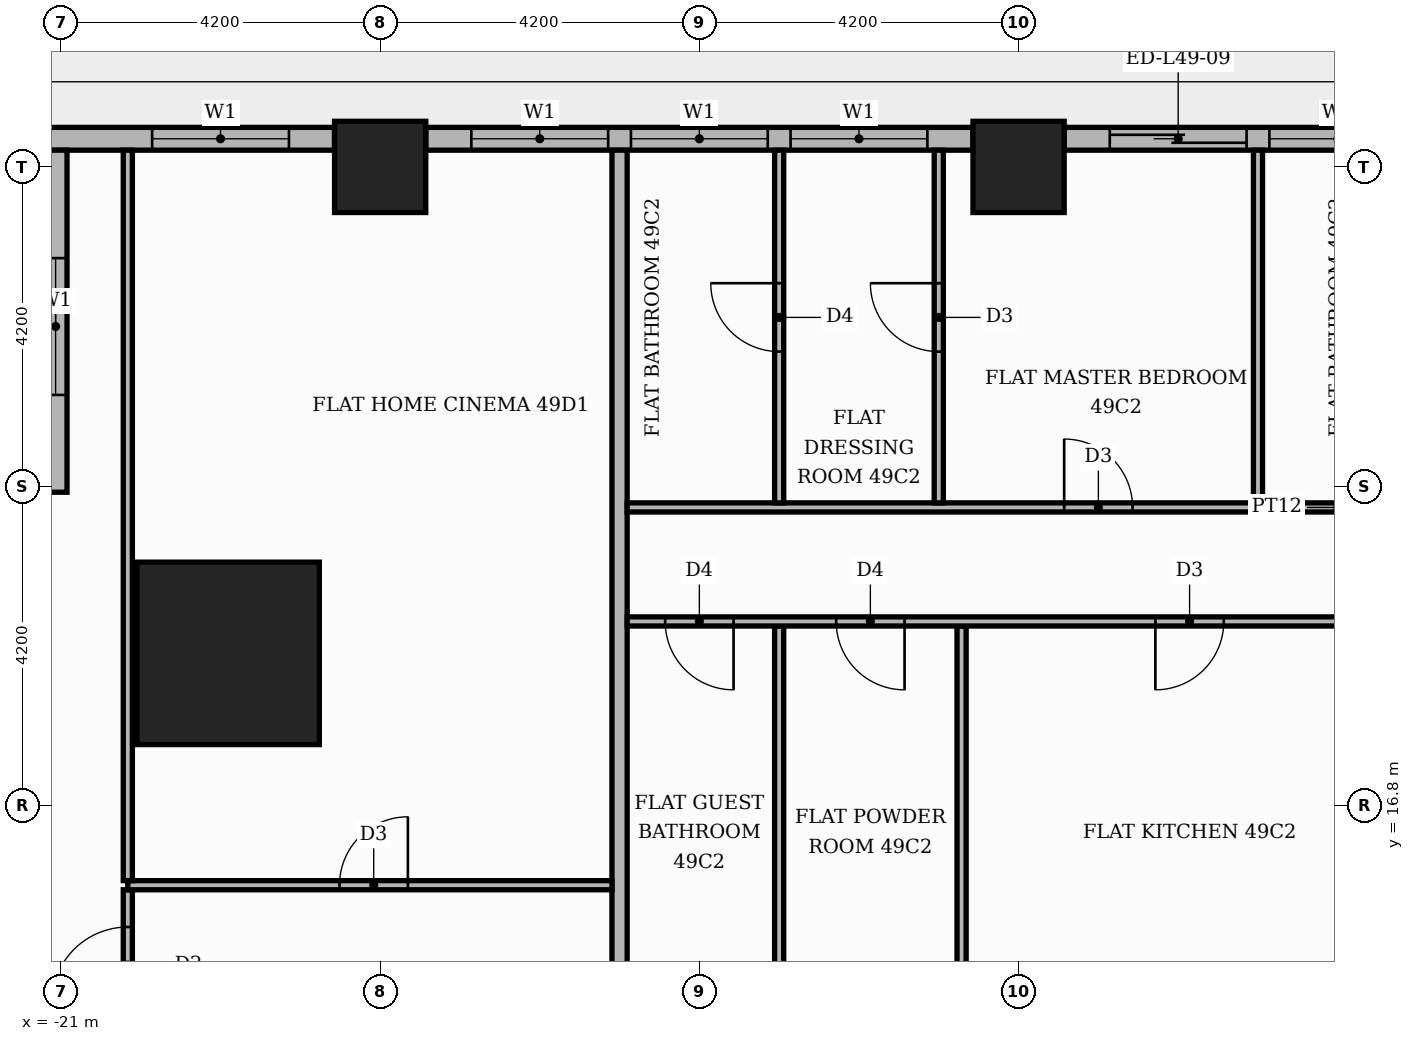
"""IFC4 building model, lengths in metres.
Left out: names, types, materials, properties, quantities, classifications, styles, units other than length and angle.
Written with IfcOpenShell. Run it as: python <this file> out.ifc"""

import sys

from ifc_helpers import new_model, si_unit, direction, frame, frame_2d, origin, origin_2d, place, context, subcontext, project, spatial, rectangle, extrude, element, fill, save


model = new_model("IFC4")
c1 = context("Model", 3, precision=1e-05, world=origin(), true_north=direction((0.0, 1.0)))
c2 = subcontext(c1, "Body", "Model", "MODEL_VIEW")
j1 = project(units=[si_unit("LENGTHUNIT", "METRE"), si_unit("PLANEANGLEUNIT", "RADIAN")], contexts=[c1])
p1 = place(None, origin())
s1 = spatial("IfcSite", under=j1, at=p1, CompositionType="ELEMENT")
p2 = place(p1, origin())
s2 = spatial("IfcBuilding", under=s1, at=p2, CompositionType="ELEMENT")
p3 = place(p2, frame((0.0, 0.0, 207.9)))
s3 = spatial("IfcBuildingStorey", under=s2, at=p3, CompositionType="ELEMENT", Elevation=207.9)
p4 = place(p3, frame((-18.8, 18.8, 0.0), z_axis=(0.0, 0.0, 1.0), x_axis=(1.0, 0.0, 0.0)))
e1 = element("IfcColumn", 1, at=p4, inside=s3, PredefinedType="COLUMN", context=c2, shape_type="SweptSolid", body=[
    extrude(rectangle(XDim=2.4, YDim=2.4, at=origin_2d()), origin(), (0.0, 0.0, 1.0), 3.9),
])
for number, where, z_axis, x_axis in (
    (2, (-8.4, 25.2, 0.0), (0.0, 0.0, 1.0), (1.0, 0.0, 0.0)),
    (3, (-16.8, 25.2, 0.0), (0.0, 0.0, 1.0), (1.0, 0.0, 0.0)),
):
    element("IfcColumn", number, at=place(p3, frame(where, z_axis=z_axis, x_axis=x_axis)), inside=s3, PredefinedType="COLUMN", context=c2, shape_type="SweptSolid", body=[
        extrude(rectangle(XDim=1.2, YDim=1.2, at=origin_2d()), origin(), (0.0, 0.0, 1.0), 3.9),
    ])
p5 = place(p3, frame((-0.6, 25.57, 0.0), z_axis=(0.0, 0.0, 1.0), x_axis=(-1.0, 0.0, 0.0)))
e4 = element("IfcWall", 4, at=p5, inside=s3, PredefinedType="STANDARD", context=c2, shape_type="SweptSolid", body=[
    extrude(rectangle(XDim=7.2, YDim=0.3, at=frame_2d((3.6, 0.0))), origin(), (0.0, 0.0, 1.0), 3.48),
])
p6 = place(p5, frame((0.6, 0.0, 0.9)))
e5 = element("IfcOpeningElement", 5, at=p6, cuts=e4, PredefinedType="OPENING", context=c2, shape_type="SweptSolid", body=[
    extrude(rectangle(XDim=1.8, YDim=2.1, at=frame_2d((0.9, 1.05))), frame((0.0, 0.16, 0.0), z_axis=(0.0, -1.0, 0.0), x_axis=(1.0, 0.0, 0.0)), (0.0, 0.0, 1.0), 0.32),
])
p7 = place(p5, frame((2.7, 0.0, 0.9)))
e6 = element("IfcOpeningElement", 6, at=p7, cuts=e4, PredefinedType="OPENING", context=c2, shape_type="SweptSolid", body=[
    extrude(rectangle(XDim=1.8, YDim=2.1, at=frame_2d((0.9, 1.05))), frame((0.0, 0.16, 0.0), z_axis=(0.0, -1.0, 0.0), x_axis=(1.0, 0.0, 0.0)), (0.0, 0.0, 1.0), 0.32),
])
p8 = place(p5, frame((4.8, 0.0, 0.0)))
e7 = element("IfcOpeningElement", 7, at=p8, cuts=e4, PredefinedType="OPENING", context=c2, shape_type="SweptSolid", body=[
    extrude(rectangle(XDim=1.8, YDim=2.4, at=frame_2d((0.9, 1.2))), frame((0.0, 0.16, 0.0), z_axis=(0.0, -1.0, 0.0), x_axis=(1.0, 0.0, 0.0)), (0.0, 0.0, 1.0), 0.32),
])
p9 = place(p3, frame((-9.0, 25.57, 0.0), z_axis=(0.0, 0.0, 1.0), x_axis=(-1.0, 0.0, 0.0)))
e8 = element("IfcWall", 8, at=p9, inside=s3, PredefinedType="STANDARD", context=c2, shape_type="SweptSolid", body=[
    extrude(rectangle(XDim=7.2, YDim=0.3, at=frame_2d((3.6, 0.0))), origin(), (0.0, 0.0, 1.0), 3.48),
])
p10 = place(p9, frame((0.6, 0.0, 0.9)))
e9 = element("IfcOpeningElement", 9, at=p10, cuts=e8, PredefinedType="OPENING", context=c2, shape_type="SweptSolid", body=[
    extrude(rectangle(XDim=1.8, YDim=2.1, at=frame_2d((0.9, 1.05))), frame((0.0, 0.16, 0.0), z_axis=(0.0, -1.0, 0.0), x_axis=(1.0, 0.0, 0.0)), (0.0, 0.0, 1.0), 0.32),
])
p11 = place(p9, frame((2.7, 0.0, 0.9)))
e10 = element("IfcOpeningElement", 10, at=p11, cuts=e8, PredefinedType="OPENING", context=c2, shape_type="SweptSolid", body=[
    extrude(rectangle(XDim=1.8, YDim=2.1, at=frame_2d((0.9, 1.05))), frame((0.0, 0.16, 0.0), z_axis=(0.0, -1.0, 0.0), x_axis=(1.0, 0.0, 0.0)), (0.0, 0.0, 1.0), 0.32),
])
p12 = place(p9, frame((4.8, 0.0, 0.9)))
e11 = element("IfcOpeningElement", 11, at=p12, cuts=e8, PredefinedType="OPENING", context=c2, shape_type="SweptSolid", body=[
    extrude(rectangle(XDim=1.8, YDim=2.1, at=frame_2d((0.9, 1.05))), frame((0.0, 0.16, 0.0), z_axis=(0.0, -1.0, 0.0), x_axis=(1.0, 0.0, 0.0)), (0.0, 0.0, 1.0), 0.32),
])
p13 = place(p3, frame((-17.4, 25.57, 0.0), z_axis=(0.0, 0.0, 1.0), x_axis=(-1.0, 0.0, 0.0)))
e12 = element("IfcWall", 12, at=p13, inside=s3, PredefinedType="STANDARD", context=c2, shape_type="SweptSolid", body=[
    extrude(rectangle(XDim=3.82, YDim=0.3, at=frame_2d((1.91, 0.0))), origin(), (0.0, 0.0, 1.0), 3.48),
])
p14 = place(p13, frame((0.6, 0.0, 0.9)))
e13 = element("IfcOpeningElement", 13, at=p14, cuts=e12, PredefinedType="OPENING", context=c2, shape_type="SweptSolid", body=[
    extrude(rectangle(XDim=1.8, YDim=2.1, at=frame_2d((0.9, 1.05))), frame((0.0, 0.16, 0.0), z_axis=(0.0, -1.0, 0.0), x_axis=(1.0, 0.0, 0.0)), (0.0, 0.0, 1.0), 0.32),
])
p15 = place(p3, frame((-21.07, 25.42, 0.0), z_axis=(0.0, 0.0, 1.0), x_axis=(0.0, -1.0, 0.0)))
e14 = element("IfcWall", 14, at=p15, inside=s3, PredefinedType="STANDARD", context=c2, shape_type="SweptSolid", body=[
    extrude(rectangle(XDim=4.5, YDim=0.3, at=frame_2d((2.25, 0.0))), origin(), (0.0, 0.0, 1.0), 3.48),
])
p16 = place(p15, frame((1.42, 0.0, 0.9)))
e15 = element("IfcOpeningElement", 15, at=p16, cuts=e14, PredefinedType="OPENING", context=c2, shape_type="SweptSolid", body=[
    extrude(rectangle(XDim=1.8, YDim=2.1, at=frame_2d((0.9, 1.05))), frame((0.0, 0.16, 0.0), z_axis=(0.0, -1.0, 0.0), x_axis=(1.0, 0.0, 0.0)), (0.0, 0.0, 1.0), 0.32),
])
p17 = place(p3, frame((-20.12, 13.71, 0.0), z_axis=(0.0, 0.0, 1.0), x_axis=(0.0, 1.0, 0.0)))
e16 = element("IfcWall", 16, at=p17, inside=s3, PredefinedType="PARTITIONING", context=c2, shape_type="SweptSolid", body=[
    extrude(rectangle(XDim=1.98, YDim=0.12, at=frame_2d((0.99, 0.0))), origin(), (0.0, 0.0, 1.0), 3.48),
])
p18 = place(p17, frame((0.49, 0.0, 0.0)))
e17 = element("IfcOpeningElement", 17, at=p18, cuts=e16, PredefinedType="OPENING", context=c2, shape_type="SweptSolid", body=[
    extrude(rectangle(XDim=1.0, YDim=2.1, at=frame_2d((0.5, 1.05))), frame((0.0, 0.07, 0.0), z_axis=(0.0, -1.0, 0.0), x_axis=(1.0, 0.0, 0.0)), (0.0, 0.0, 1.0), 0.14),
])
p19 = place(p3, frame((-13.65, 13.75, 0.0), z_axis=(0.0, 0.0, 1.0), x_axis=(0.0, 1.0, 0.0)))
e18 = element("IfcWall", 18, at=p19, inside=s3, PredefinedType="PARTITIONING", context=c2, shape_type="SweptSolid", body=[
    extrude(rectangle(XDim=11.67, YDim=0.2, at=frame_2d((5.835, 0.0))), origin(), (0.0, 0.0, 1.0), 3.48),
])
for number, where, z_axis, x_axis in (
    (19, (-11.55, 13.75, 0.0), (0.0, 0.0, 1.0), (0.0, 1.0, 0.0)),
    (20, (-9.15, 13.75, 0.0), (0.0, 0.0, 1.0), (0.0, 1.0, 0.0)),
):
    element("IfcWall", number, at=place(p3, frame(where, z_axis=z_axis, x_axis=x_axis)), inside=s3, PredefinedType="PARTITIONING", context=c2, shape_type="SweptSolid", body=[
        extrude(rectangle(XDim=5.41, YDim=0.12, at=frame_2d((2.705, 0.0))), origin(), (0.0, 0.0, 1.0), 3.48),
    ])
p20 = place(p3, frame((-20.12, 15.75, 0.0), z_axis=(0.0, 0.0, 1.0), x_axis=(1.0, 0.0, 0.0)))
e21 = element("IfcWall", 21, at=p20, inside=s3, PredefinedType="PARTITIONING", context=c2, shape_type="SweptSolid", body=[
    extrude(rectangle(XDim=6.37, YDim=0.12, at=frame_2d((3.185, 0.0))), origin(), (0.0, 0.0, 1.0), 3.48),
])
p21 = place(p20, frame((2.785, 0.0, 0.0)))
e22 = element("IfcOpeningElement", 22, at=p21, cuts=e21, PredefinedType="OPENING", context=c2, shape_type="SweptSolid", body=[
    extrude(rectangle(XDim=0.9, YDim=2.1, at=frame_2d((0.45, 1.05))), frame((0.0, 0.07, 0.0), z_axis=(0.0, -1.0, 0.0), x_axis=(1.0, 0.0, 0.0)), (0.0, 0.0, 1.0), 0.14),
])
p22 = place(p3, frame((-20.12, 15.81, 0.0), z_axis=(0.0, 0.0, 1.0), x_axis=(0.0, 1.0, 0.0)))
e23 = element("IfcWall", 23, at=p22, inside=s3, PredefinedType="PARTITIONING", context=c2, shape_type="SweptSolid", body=[
    extrude(rectangle(XDim=9.61, YDim=0.12, at=frame_2d((4.805, 0.0))), origin(), (0.0, 0.0, 1.0), 3.48),
])
p23 = place(p3, frame((-13.55, 19.22, 0.0), z_axis=(0.0, 0.0, 1.0), x_axis=(1.0, 0.0, 0.0)))
e24 = element("IfcWall", 24, at=p23, inside=s3, PredefinedType="PARTITIONING", context=c2, shape_type="SweptSolid", body=[
    extrude(rectangle(XDim=10.4, YDim=0.12, at=frame_2d((5.2, 0.0))), origin(), (0.0, 0.0, 1.0), 3.48),
])
p24 = place(p23, frame((6.95, 0.0, 0.0)))
e25 = element("IfcOpeningElement", 25, at=p24, cuts=e24, PredefinedType="OPENING", context=c2, shape_type="SweptSolid", body=[
    extrude(rectangle(XDim=0.9, YDim=2.1, at=frame_2d((0.45, 1.05))), frame((0.0, 0.07, 0.0), z_axis=(0.0, -1.0, 0.0), x_axis=(1.0, 0.0, 0.0)), (0.0, 0.0, 1.0), 0.14),
])
p25 = place(p23, frame((2.75, 0.0, 0.0)))
e26 = element("IfcOpeningElement", 26, at=p25, cuts=e24, PredefinedType="OPENING", context=c2, shape_type="SweptSolid", body=[
    extrude(rectangle(XDim=0.9, YDim=2.1, at=frame_2d((0.45, 1.05))), frame((0.0, 0.07, 0.0), z_axis=(0.0, -1.0, 0.0), x_axis=(1.0, 0.0, 0.0)), (0.0, 0.0, 1.0), 0.14),
])
p26 = place(p23, frame((0.5, 0.0, 0.0)))
e27 = element("IfcOpeningElement", 27, at=p26, cuts=e24, PredefinedType="OPENING", context=c2, shape_type="SweptSolid", body=[
    extrude(rectangle(XDim=0.9, YDim=2.1, at=frame_2d((0.45, 1.05))), frame((0.0, 0.07, 0.0), z_axis=(0.0, -1.0, 0.0), x_axis=(1.0, 0.0, 0.0)), (0.0, 0.0, 1.0), 0.14),
])
p27 = place(p3, frame((-13.55, 20.72, 0.0), z_axis=(0.0, 0.0, 1.0), x_axis=(1.0, 0.0, 0.0)))
e28 = element("IfcWall", 28, at=p27, inside=s3, PredefinedType="PARTITIONING", context=c2, shape_type="SweptSolid", body=[
    extrude(rectangle(XDim=18.7, YDim=0.12, at=frame_2d((9.35, 0.0))), origin(), (0.0, 0.0, 1.0), 3.48),
])
p28 = place(p27, frame((16.2, 0.0, 0.0)))
e29 = element("IfcOpeningElement", 29, at=p28, cuts=e28, PredefinedType="OPENING", context=c2, shape_type="SweptSolid", body=[
    extrude(rectangle(XDim=1.0, YDim=2.1, at=frame_2d((0.5, 1.05))), frame((0.0, 0.07, 0.0), z_axis=(0.0, -1.0, 0.0), x_axis=(1.0, 0.0, 0.0)), (0.0, 0.0, 1.0), 0.14),
])
p29 = place(p27, frame((12.05, 0.0, 0.0)))
e30 = element("IfcOpeningElement", 30, at=p29, cuts=e28, PredefinedType="OPENING", context=c2, shape_type="SweptSolid", body=[
    extrude(rectangle(XDim=0.9, YDim=2.1, at=frame_2d((0.45, 1.05))), frame((0.0, 0.07, 0.0), z_axis=(0.0, -1.0, 0.0), x_axis=(1.0, 0.0, 0.0)), (0.0, 0.0, 1.0), 0.14),
])
p30 = place(p27, frame((5.75, 0.0, 0.0)))
e31 = element("IfcOpeningElement", 31, at=p30, cuts=e28, PredefinedType="OPENING", context=c2, shape_type="SweptSolid", body=[
    extrude(rectangle(XDim=0.9, YDim=2.1, at=frame_2d((0.45, 1.05))), frame((0.0, 0.07, 0.0), z_axis=(0.0, -1.0, 0.0), x_axis=(1.0, 0.0, 0.0)), (0.0, 0.0, 1.0), 0.14),
])
p31 = place(p3, frame((-11.55, 20.78, 0.0), z_axis=(0.0, 0.0, 1.0), x_axis=(0.0, 1.0, 0.0)))
e32 = element("IfcWall", 32, at=p31, inside=s3, PredefinedType="PARTITIONING", context=c2, shape_type="SweptSolid", body=[
    extrude(rectangle(XDim=4.64, YDim=0.12, at=frame_2d((2.32, 0.0))), origin(), (0.0, 0.0, 1.0), 3.48),
])
p32 = place(p31, frame((1.99, 0.0, 0.0)))
e33 = element("IfcOpeningElement", 33, at=p32, cuts=e32, PredefinedType="OPENING", context=c2, shape_type="SweptSolid", body=[
    extrude(rectangle(XDim=0.9, YDim=2.1, at=frame_2d((0.45, 1.05))), frame((0.0, 0.07, 0.0), z_axis=(0.0, -1.0, 0.0), x_axis=(1.0, 0.0, 0.0)), (0.0, 0.0, 1.0), 0.14),
])
p33 = place(p3, frame((-9.45, 20.78, 0.0), z_axis=(0.0, 0.0, 1.0), x_axis=(0.0, 1.0, 0.0)))
e34 = element("IfcWall", 34, at=p33, inside=s3, PredefinedType="PARTITIONING", context=c2, shape_type="SweptSolid", body=[
    extrude(rectangle(XDim=4.64, YDim=0.12, at=frame_2d((2.32, 0.0))), origin(), (0.0, 0.0, 1.0), 3.48),
])
p34 = place(p33, frame((1.99, 0.0, 0.0)))
e35 = element("IfcOpeningElement", 35, at=p34, cuts=e34, PredefinedType="OPENING", context=c2, shape_type="SweptSolid", body=[
    extrude(rectangle(XDim=0.9, YDim=2.1, at=frame_2d((0.45, 1.05))), frame((0.0, 0.07, 0.0), z_axis=(0.0, -1.0, 0.0), x_axis=(1.0, 0.0, 0.0)), (0.0, 0.0, 1.0), 0.14),
])
p35 = place(p3, frame((-5.25, 20.78, 0.0), z_axis=(0.0, 0.0, 1.0), x_axis=(0.0, 1.0, 0.0)))
e36 = element("IfcWall", 36, at=p35, inside=s3, PredefinedType="PARTITIONING", context=c2, shape_type="SweptSolid", body=[
    extrude(rectangle(XDim=4.64, YDim=0.12, at=frame_2d((2.32, 0.0))), origin(), (0.0, 0.0, 1.0), 3.48),
])
p36 = place(p7, origin())
e37 = element("IfcWindow", 37, at=p36, inside=s3, PartitioningType="SINGLE_PANEL", PredefinedType="WINDOW", context=c2, shape_type="SweptSolid", body=[
    extrude(rectangle(XDim=1.8, YDim=2.1, at=frame_2d((0.9, 1.05))), frame((0.0, 0.03, 0.0), z_axis=(0.0, -1.0, 0.0), x_axis=(1.0, 0.0, 0.0)), (0.0, 0.0, 1.0), 0.06),
])
fill(e6, e37)
p37 = place(p8, origin())
e38 = element("IfcDoor", 38, at=p37, inside=s3, OperationType="SLIDING_TO_RIGHT", PredefinedType="DOOR", context=c2, shape_type="SweptSolid", body=[
    extrude(rectangle(XDim=1.8, YDim=2.4, at=frame_2d((0.9, 1.2))), frame((0.0, 0.025, 0.0), z_axis=(0.0, -1.0, 0.0), x_axis=(1.0, 0.0, 0.0)), (0.0, 0.0, 1.0), 0.05),
])
fill(e7, e38)
p38 = place(p10, origin())
e39 = element("IfcWindow", 39, at=p38, inside=s3, PartitioningType="SINGLE_PANEL", PredefinedType="WINDOW", context=c2, shape_type="SweptSolid", body=[
    extrude(rectangle(XDim=1.8, YDim=2.1, at=frame_2d((0.9, 1.05))), frame((0.0, 0.03, 0.0), z_axis=(0.0, -1.0, 0.0), x_axis=(1.0, 0.0, 0.0)), (0.0, 0.0, 1.0), 0.06),
])
fill(e9, e39)
p39 = place(p11, origin())
e40 = element("IfcWindow", 40, at=p39, inside=s3, PartitioningType="SINGLE_PANEL", PredefinedType="WINDOW", context=c2, shape_type="SweptSolid", body=[
    extrude(rectangle(XDim=1.8, YDim=2.1, at=frame_2d((0.9, 1.05))), frame((0.0, 0.03, 0.0), z_axis=(0.0, -1.0, 0.0), x_axis=(1.0, 0.0, 0.0)), (0.0, 0.0, 1.0), 0.06),
])
fill(e10, e40)
p40 = place(p12, origin())
e41 = element("IfcWindow", 41, at=p40, inside=s3, PartitioningType="SINGLE_PANEL", PredefinedType="WINDOW", context=c2, shape_type="SweptSolid", body=[
    extrude(rectangle(XDim=1.8, YDim=2.1, at=frame_2d((0.9, 1.05))), frame((0.0, 0.03, 0.0), z_axis=(0.0, -1.0, 0.0), x_axis=(1.0, 0.0, 0.0)), (0.0, 0.0, 1.0), 0.06),
])
fill(e11, e41)
p41 = place(p14, origin())
e42 = element("IfcWindow", 42, at=p41, inside=s3, PartitioningType="SINGLE_PANEL", PredefinedType="WINDOW", context=c2, shape_type="SweptSolid", body=[
    extrude(rectangle(XDim=1.8, YDim=2.1, at=frame_2d((0.9, 1.05))), frame((0.0, 0.03, 0.0), z_axis=(0.0, -1.0, 0.0), x_axis=(1.0, 0.0, 0.0)), (0.0, 0.0, 1.0), 0.06),
])
fill(e13, e42)
p42 = place(p16, origin())
e43 = element("IfcWindow", 43, at=p42, inside=s3, PartitioningType="SINGLE_PANEL", PredefinedType="WINDOW", context=c2, shape_type="SweptSolid", body=[
    extrude(rectangle(XDim=1.8, YDim=2.1, at=frame_2d((0.9, 1.05))), frame((0.0, 0.03, 0.0), z_axis=(0.0, -1.0, 0.0), x_axis=(1.0, 0.0, 0.0)), (0.0, 0.0, 1.0), 0.06),
])
fill(e15, e43)
p43 = place(p24, frame((0.9, 0.0, 0.0), z_axis=(0.0, 0.0, 1.0), x_axis=(-1.0, 0.0, 0.0)))
e44 = element("IfcDoor", 44, at=p43, inside=s3, OperationType="SINGLE_SWING_LEFT", PredefinedType="DOOR", context=c2, shape_type="SweptSolid", body=[
    extrude(rectangle(XDim=0.9, YDim=2.1, at=frame_2d((0.45, 1.05))), frame((0.0, 0.025, 0.0), z_axis=(0.0, -1.0, 0.0), x_axis=(1.0, 0.0, 0.0)), (0.0, 0.0, 1.0), 0.05),
])
fill(e25, e44)
p44 = place(p25, frame((0.9, 0.0, 0.0), z_axis=(0.0, 0.0, 1.0), x_axis=(-1.0, 0.0, 0.0)))
e45 = element("IfcDoor", 45, at=p44, inside=s3, OperationType="SINGLE_SWING_RIGHT", PredefinedType="DOOR", context=c2, shape_type="SweptSolid", body=[
    extrude(rectangle(XDim=0.9, YDim=2.1, at=frame_2d((0.45, 1.05))), frame((0.0, 0.025, 0.0), z_axis=(0.0, -1.0, 0.0), x_axis=(1.0, 0.0, 0.0)), (0.0, 0.0, 1.0), 0.05),
])
fill(e26, e45)
p45 = place(p26, frame((0.9, 0.0, 0.0), z_axis=(0.0, 0.0, 1.0), x_axis=(-1.0, 0.0, 0.0)))
e46 = element("IfcDoor", 46, at=p45, inside=s3, OperationType="SINGLE_SWING_RIGHT", PredefinedType="DOOR", context=c2, shape_type="SweptSolid", body=[
    extrude(rectangle(XDim=0.9, YDim=2.1, at=frame_2d((0.45, 1.05))), frame((0.0, 0.025, 0.0), z_axis=(0.0, -1.0, 0.0), x_axis=(1.0, 0.0, 0.0)), (0.0, 0.0, 1.0), 0.05),
])
fill(e27, e46)
p46 = place(p30, origin())
e47 = element("IfcDoor", 47, at=p46, inside=s3, OperationType="SINGLE_SWING_LEFT", PredefinedType="DOOR", context=c2, shape_type="SweptSolid", body=[
    extrude(rectangle(XDim=0.9, YDim=2.1, at=frame_2d((0.45, 1.05))), frame((0.0, 0.025, 0.0), z_axis=(0.0, -1.0, 0.0), x_axis=(1.0, 0.0, 0.0)), (0.0, 0.0, 1.0), 0.05),
])
fill(e31, e47)
p47 = place(p34, origin())
e48 = element("IfcDoor", 48, at=p47, inside=s3, OperationType="SINGLE_SWING_RIGHT", PredefinedType="DOOR", context=c2, shape_type="SweptSolid", body=[
    extrude(rectangle(XDim=0.9, YDim=2.1, at=frame_2d((0.45, 1.05))), frame((0.0, 0.025, 0.0), z_axis=(0.0, -1.0, 0.0), x_axis=(1.0, 0.0, 0.0)), (0.0, 0.0, 1.0), 0.05),
])
fill(e35, e48)
p48 = place(p32, origin())
e49 = element("IfcDoor", 49, at=p48, inside=s3, OperationType="SINGLE_SWING_RIGHT", PredefinedType="DOOR", context=c2, shape_type="SweptSolid", body=[
    extrude(rectangle(XDim=0.9, YDim=2.1, at=frame_2d((0.45, 1.05))), frame((0.0, 0.025, 0.0), z_axis=(0.0, -1.0, 0.0), x_axis=(1.0, 0.0, 0.0)), (0.0, 0.0, 1.0), 0.05),
])
fill(e33, e49)
p49 = place(p21, origin())
e50 = element("IfcDoor", 50, at=p49, inside=s3, OperationType="SINGLE_SWING_RIGHT", PredefinedType="DOOR", context=c2, shape_type="SweptSolid", body=[
    extrude(rectangle(XDim=0.9, YDim=2.1, at=frame_2d((0.45, 1.05))), frame((0.0, 0.025, 0.0), z_axis=(0.0, -1.0, 0.0), x_axis=(1.0, 0.0, 0.0)), (0.0, 0.0, 1.0), 0.05),
])
fill(e22, e50)
p50 = place(p18, origin())
e51 = element("IfcDoor", 51, at=p50, inside=s3, OperationType="SINGLE_SWING_LEFT", PredefinedType="DOOR", context=c2, shape_type="SweptSolid", body=[
    extrude(rectangle(XDim=1.0, YDim=2.1, at=frame_2d((0.5, 1.05))), frame((0.0, 0.025, 0.0), z_axis=(0.0, -1.0, 0.0), x_axis=(1.0, 0.0, 0.0)), (0.0, 0.0, 1.0), 0.05),
])
fill(e17, e51)
save(model, sys.argv[1])
